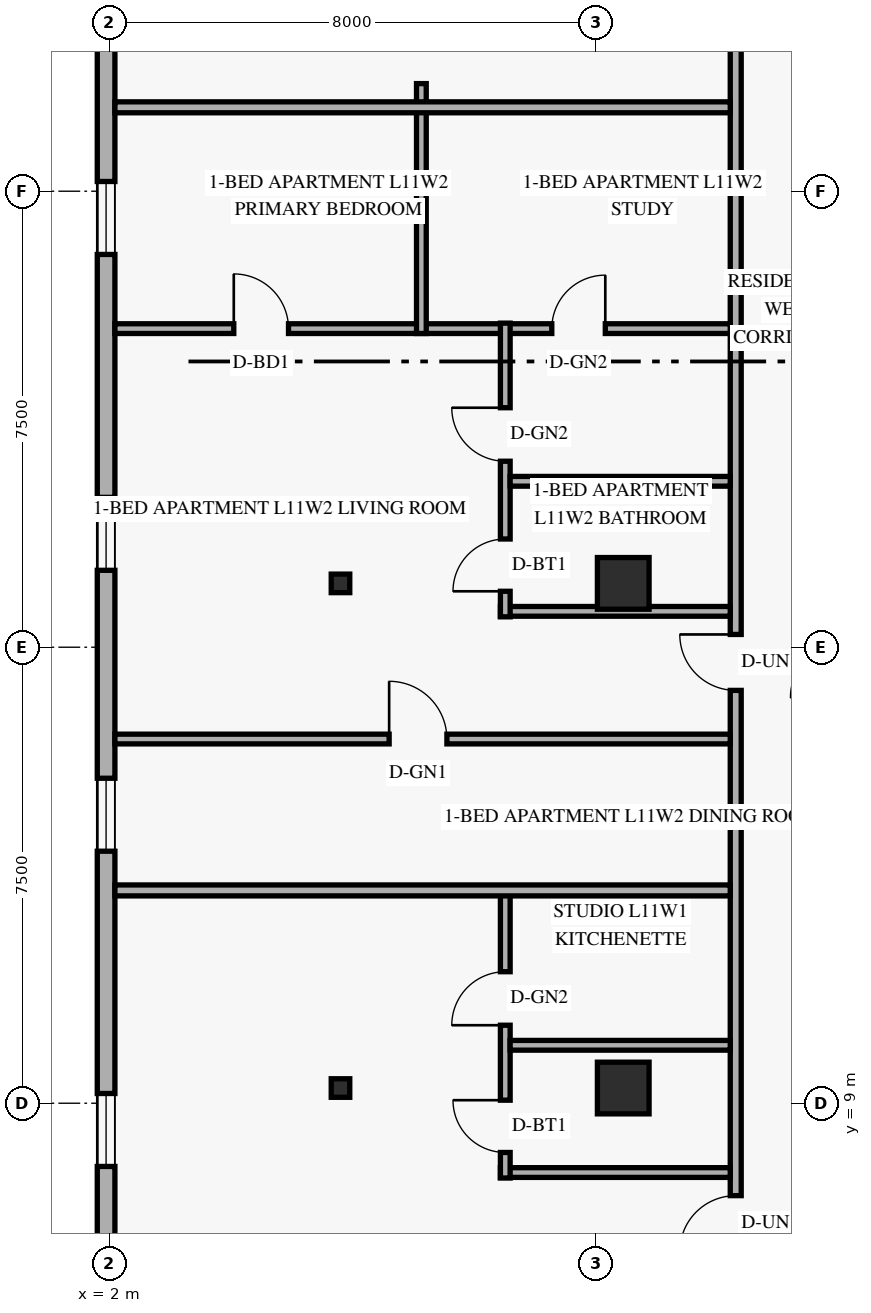
"""IFC4 building model, lengths in metres.
Left out: names, types, materials, properties, quantities, classifications, styles, units other than length and angle.
Written with IfcOpenShell. Run it as: python <this file> out.ifc"""

import sys

from ifc_helpers import new_model, si_unit, direction, frame, frame_2d, origin, origin_2d, place, context, subcontext, project, spatial, rectangle, hollow_rectangle, extrude, element, fill, save


model = new_model("IFC4")
c1 = context("Model", 3, precision=1e-05, world=origin(), true_north=direction((0.0, 1.0)))
c2 = subcontext(c1, "Body", "Model", "MODEL_VIEW")
j1 = project(units=[si_unit("LENGTHUNIT", "METRE"), si_unit("PLANEANGLEUNIT", "RADIAN")], contexts=[c1])
p1 = place(None, origin())
s1 = spatial("IfcSite", under=j1, at=p1, CompositionType="ELEMENT")
p2 = place(p1, origin())
s2 = spatial("IfcBuilding", under=s1, at=p2, CompositionType="ELEMENT")
p3 = place(p2, frame((0.0, 0.0, 45.6)))
s3 = spatial("IfcBuildingStorey", under=s2, at=p3, CompositionType="ELEMENT", Elevation=45.6)
for number, where, z_axis, x_axis in (
    (1, (5.8, 9.25, 0.0), (0.0, 0.0, 1.0), (1.0, 0.0, 0.0)),
    (2, (5.8, 17.55, 0.0), (0.0, 0.0, 1.0), (1.0, 0.0, 0.0)),
):
    element("IfcColumn", number, at=place(p3, frame(where, z_axis=z_axis, x_axis=x_axis)), inside=s3, PredefinedType="COLUMN", context=c2, shape_type="SweptSolid", body=[
        extrude(hollow_rectangle(XDim=0.305, YDim=0.305, WallThickness=0.013, at=origin_2d()), origin(), (0.0, 0.0, 1.0), 3.6),
    ])
for number, where, z_axis, x_axis in (
    (3, (10.45, 9.25, 0.0), (0.0, 0.0, 1.0), (1.0, 0.0, 0.0)),
    (4, (10.45, 17.55, 0.0), (0.0, 0.0, 1.0), (1.0, 0.0, 0.0)),
):
    element("IfcColumn", number, at=place(p3, frame(where, z_axis=z_axis, x_axis=x_axis)), inside=s3, PredefinedType="COLUMN", context=c2, shape_type="SweptSolid", body=[
        extrude(rectangle(XDim=0.85, YDim=0.85, at=origin_2d()), origin(), (0.0, 0.0, 1.0), 3.6),
    ])
p4 = place(p3, frame((1.945, 43.38, 0.0), z_axis=(0.0, 0.0, 1.0), x_axis=(0.0, -1.0, 0.0)))
e5 = element("IfcWall", 5, at=p4, inside=s3, PredefinedType="SOLIDWALL", context=c2, shape_type="SweptSolid", body=[
    extrude(rectangle(XDim=38.76, YDim=0.29, at=frame_2d((19.38, 0.0))), origin(), (0.0, 0.0, 1.0), 3.36),
])
p5 = place(p4, frame((34.22, 0.0, 0.85)))
e6 = element("IfcOpeningElement", 6, at=p5, cuts=e5, PredefinedType="OPENING", context=c2, shape_type="SweptSolid", body=[
    extrude(rectangle(XDim=1.2, YDim=1.5, at=frame_2d((0.6, 0.75))), frame((0.0, 0.155, 0.0), z_axis=(0.0, -1.0, 0.0), x_axis=(1.0, 0.0, 0.0)), (0.0, 0.0, 1.0), 0.31),
])
p6 = place(p4, frame((29.035, 0.0, 0.85)))
e7 = element("IfcOpeningElement", 7, at=p6, cuts=e5, PredefinedType="OPENING", context=c2, shape_type="SweptSolid", body=[
    extrude(rectangle(XDim=1.2, YDim=1.5, at=frame_2d((0.6, 0.75))), frame((0.0, 0.155, 0.0), z_axis=(0.0, -1.0, 0.0), x_axis=(1.0, 0.0, 0.0)), (0.0, 0.0, 1.0), 0.31),
])
p7 = place(p4, frame((24.415, 0.0, 0.85)))
e8 = element("IfcOpeningElement", 8, at=p7, cuts=e5, PredefinedType="OPENING", context=c2, shape_type="SweptSolid", body=[
    extrude(rectangle(XDim=1.2, YDim=1.5, at=frame_2d((0.6, 0.75))), frame((0.0, 0.155, 0.0), z_axis=(0.0, -1.0, 0.0), x_axis=(1.0, 0.0, 0.0)), (0.0, 0.0, 1.0), 0.31),
])
p8 = place(p4, frame((19.22, 0.0, 0.85)))
e9 = element("IfcOpeningElement", 9, at=p8, cuts=e5, PredefinedType="OPENING", context=c2, shape_type="SweptSolid", body=[
    extrude(rectangle(XDim=1.2, YDim=1.5, at=frame_2d((0.6, 0.75))), frame((0.0, 0.155, 0.0), z_axis=(0.0, -1.0, 0.0), x_axis=(1.0, 0.0, 0.0)), (0.0, 0.0, 1.0), 0.31),
])
p9 = place(p4, frame((13.415, 0.0, 0.85)))
e10 = element("IfcOpeningElement", 10, at=p9, cuts=e5, PredefinedType="OPENING", context=c2, shape_type="SweptSolid", body=[
    extrude(rectangle(XDim=1.2, YDim=1.5, at=frame_2d((0.6, 0.75))), frame((0.0, 0.155, 0.0), z_axis=(0.0, -1.0, 0.0), x_axis=(1.0, 0.0, 0.0)), (0.0, 0.0, 1.0), 0.31),
])
p10 = place(p4, frame((7.435, 0.0, 0.85)))
e11 = element("IfcOpeningElement", 11, at=p10, cuts=e5, PredefinedType="OPENING", context=c2, shape_type="SweptSolid", body=[
    extrude(rectangle(XDim=1.2, YDim=1.5, at=frame_2d((0.6, 0.75))), frame((0.0, 0.155, 0.0), z_axis=(0.0, -1.0, 0.0), x_axis=(1.0, 0.0, 0.0)), (0.0, 0.0, 1.0), 0.31),
])
p11 = place(p4, frame((2.42, 0.0, 0.85)))
e12 = element("IfcOpeningElement", 12, at=p11, cuts=e5, PredefinedType="OPENING", context=c2, shape_type="SweptSolid", body=[
    extrude(rectangle(XDim=1.2, YDim=1.5, at=frame_2d((0.6, 0.75))), frame((0.0, 0.155, 0.0), z_axis=(0.0, -1.0, 0.0), x_axis=(1.0, 0.0, 0.0)), (0.0, 0.0, 1.0), 0.31),
])
p12 = place(p3, frame((12.3, 1.29, 0.0), z_axis=(0.0, 0.0, 1.0), x_axis=(0.0, 1.0, 0.0)))
e13 = element("IfcWall", 13, at=p12, inside=s3, PredefinedType="STANDARD", context=c2, shape_type="SweptSolid", body=[
    extrude(rectangle(XDim=45.42, YDim=0.18, at=frame_2d((22.71, 0.0))), origin(), (0.0, 0.0, 1.0), 2.649),
])
p13 = place(p12, frame((5.27, 0.0, 0.0)))
e14 = element("IfcOpeningElement", 14, at=p13, cuts=e13, PredefinedType="OPENING", context=c2, shape_type="SweptSolid", body=[
    extrude(rectangle(XDim=0.92, YDim=2.15, at=frame_2d((0.46, 1.075))), frame((0.0, 0.1, 0.0), z_axis=(0.0, -1.0, 0.0), x_axis=(1.0, 0.0, 0.0)), (0.0, 0.0, 1.0), 0.2),
])
p14 = place(p12, frame((14.5, 0.0, 0.0)))
e15 = element("IfcOpeningElement", 15, at=p14, cuts=e13, PredefinedType="OPENING", context=c2, shape_type="SweptSolid", body=[
    extrude(rectangle(XDim=0.92, YDim=2.15, at=frame_2d((0.46, 1.075))), frame((0.0, 0.1, 0.0), z_axis=(0.0, -1.0, 0.0), x_axis=(1.0, 0.0, 0.0)), (0.0, 0.0, 1.0), 0.2),
])
p15 = place(p12, frame((26.082, 0.0, 0.0)))
e16 = element("IfcOpeningElement", 16, at=p15, cuts=e13, PredefinedType="OPENING", context=c2, shape_type="SweptSolid", body=[
    extrude(rectangle(XDim=0.92, YDim=2.15, at=frame_2d((0.46, 1.075))), frame((0.0, 0.1, 0.0), z_axis=(0.0, -1.0, 0.0), x_axis=(1.0, 0.0, 0.0)), (0.0, 0.0, 1.0), 0.2),
])
p16 = place(p12, frame((41.05, 0.0, 0.0)))
e17 = element("IfcOpeningElement", 17, at=p16, cuts=e13, PredefinedType="OPENING", context=c2, shape_type="SweptSolid", body=[
    extrude(rectangle(XDim=0.92, YDim=2.15, at=frame_2d((0.46, 1.075))), frame((0.0, 0.1, 0.0), z_axis=(0.0, -1.0, 0.0), x_axis=(1.0, 0.0, 0.0)), (0.0, 0.0, 1.0), 0.2),
])
p17 = place(p3, frame((8.43, 7.86, 0.0), z_axis=(0.0, 0.0, 1.0), x_axis=(1.0, 0.0, 0.0)))
e18 = element("IfcWall", 18, at=p17, inside=s3, PredefinedType="PLUMBINGWALL", context=c2, shape_type="SweptSolid", body=[
    extrude(rectangle(XDim=3.78, YDim=0.16, at=frame_2d((1.89, 0.0))), origin(), (0.0, 0.0, 1.0), 2.649),
])
p18 = place(p3, frame((8.51, 7.77, 0.0), z_axis=(0.0, 0.0, 1.0), x_axis=(0.0, 1.0, 0.0)))
e19 = element("IfcWall", 19, at=p18, inside=s3, PredefinedType="PLUMBINGWALL", context=c2, shape_type="SweptSolid", body=[
    extrude(rectangle(XDim=4.73, YDim=0.16, at=frame_2d((2.365, 0.0))), origin(), (0.0, 0.0, 1.0), 2.649),
])
p19 = place(p18, frame((0.42, 0.0, 0.0)))
e20 = element("IfcOpeningElement", 20, at=p19, cuts=e19, PredefinedType="OPENING", context=c2, shape_type="SweptSolid", body=[
    extrude(rectangle(XDim=0.86, YDim=2.12, at=frame_2d((0.43, 1.06))), frame((0.0, 0.09, 0.0), z_axis=(0.0, -1.0, 0.0), x_axis=(1.0, 0.0, 0.0)), (0.0, 0.0, 1.0), 0.18),
])
p20 = place(p18, frame((2.513, 0.0, 0.0)))
e21 = element("IfcOpeningElement", 21, at=p20, cuts=e19, PredefinedType="OPENING", context=c2, shape_type="SweptSolid", body=[
    extrude(rectangle(XDim=0.88, YDim=2.12, at=frame_2d((0.44, 1.06))), frame((0.0, 0.09, 0.0), z_axis=(0.0, -1.0, 0.0), x_axis=(1.0, 0.0, 0.0)), (0.0, 0.0, 1.0), 0.18),
])
p21 = place(p3, frame((8.59, 9.953, 0.0), z_axis=(0.0, 0.0, 1.0), x_axis=(1.0, 0.0, 0.0)))
e22 = element("IfcWall", 22, at=p21, inside=s3, PredefinedType="PLUMBINGWALL", context=c2, shape_type="SweptSolid", body=[
    extrude(rectangle(XDim=3.62, YDim=0.16, at=frame_2d((1.81, 0.0))), origin(), (0.0, 0.0, 1.0), 2.649),
])
p22 = place(p3, frame((2.09, 12.5, 0.0), z_axis=(0.0, 0.0, 1.0), x_axis=(1.0, 0.0, 0.0)))
e23 = element("IfcWall", 23, at=p22, inside=s3, PredefinedType="PARTITIONING", context=c2, shape_type="SweptSolid", body=[
    extrude(rectangle(XDim=10.12, YDim=0.18, at=frame_2d((5.06, 0.0))), origin(), (0.0, 0.0, 1.0), 2.649),
])
p23 = place(p3, frame((2.09, 21.74, 0.0), z_axis=(0.0, 0.0, 1.0), x_axis=(1.0, 0.0, 0.0)))
e24 = element("IfcWall", 24, at=p23, inside=s3, PredefinedType="PARTITIONING", context=c2, shape_type="SweptSolid", body=[
    extrude(rectangle(XDim=10.12, YDim=0.16, at=frame_2d((5.06, 0.0))), origin(), (0.0, 0.0, 1.0), 2.649),
])
p24 = place(p23, frame((7.185, 0.0, 0.0)))
e25 = element("IfcOpeningElement", 25, at=p24, cuts=e24, PredefinedType="OPENING", context=c2, shape_type="SweptSolid", body=[
    extrude(rectangle(XDim=0.88, YDim=2.12, at=frame_2d((0.44, 1.06))), frame((0.0, 0.09, 0.0), z_axis=(0.0, -1.0, 0.0), x_axis=(1.0, 0.0, 0.0)), (0.0, 0.0, 1.0), 0.18),
])
p25 = place(p23, frame((1.955, 0.0, 0.0)))
e26 = element("IfcOpeningElement", 26, at=p25, cuts=e24, PredefinedType="OPENING", context=c2, shape_type="SweptSolid", body=[
    extrude(rectangle(XDim=0.9, YDim=2.14, at=frame_2d((0.45, 1.07))), frame((0.0, 0.09, 0.0), z_axis=(0.0, -1.0, 0.0), x_axis=(1.0, 0.0, 0.0)), (0.0, 0.0, 1.0), 0.18),
])
p26 = place(p3, frame((8.43, 17.09, 0.0), z_axis=(0.0, 0.0, 1.0), x_axis=(1.0, 0.0, 0.0)))
e27 = element("IfcWall", 27, at=p26, inside=s3, PredefinedType="PLUMBINGWALL", context=c2, shape_type="SweptSolid", body=[
    extrude(rectangle(XDim=3.78, YDim=0.16, at=frame_2d((1.89, 0.0))), origin(), (0.0, 0.0, 1.0), 2.649),
])
p27 = place(p3, frame((8.51, 17.0, 0.0), z_axis=(0.0, 0.0, 1.0), x_axis=(0.0, 1.0, 0.0)))
e28 = element("IfcWall", 28, at=p27, inside=s3, PredefinedType="PLUMBINGWALL", context=c2, shape_type="SweptSolid", body=[
    extrude(rectangle(XDim=4.83, YDim=0.16, at=frame_2d((2.415, 0.0))), origin(), (0.0, 0.0, 1.0), 2.649),
])
p28 = place(p27, frame((0.42, 0.0, 0.0)))
e29 = element("IfcOpeningElement", 29, at=p28, cuts=e28, PredefinedType="OPENING", context=c2, shape_type="SweptSolid", body=[
    extrude(rectangle(XDim=0.86, YDim=2.12, at=frame_2d((0.43, 1.06))), frame((0.0, 0.09, 0.0), z_axis=(0.0, -1.0, 0.0), x_axis=(1.0, 0.0, 0.0)), (0.0, 0.0, 1.0), 0.18),
])
p29 = place(p27, frame((2.559, 0.0, 0.0)))
e30 = element("IfcOpeningElement", 30, at=p29, cuts=e28, PredefinedType="OPENING", context=c2, shape_type="SweptSolid", body=[
    extrude(rectangle(XDim=0.88, YDim=2.12, at=frame_2d((0.44, 1.06))), frame((0.0, 0.09, 0.0), z_axis=(0.0, -1.0, 0.0), x_axis=(1.0, 0.0, 0.0)), (0.0, 0.0, 1.0), 0.18),
])
p30 = place(p3, frame((8.59, 19.229, 0.0), z_axis=(0.0, 0.0, 1.0), x_axis=(1.0, 0.0, 0.0)))
e31 = element("IfcWall", 31, at=p30, inside=s3, PredefinedType="PLUMBINGWALL", context=c2, shape_type="SweptSolid", body=[
    extrude(rectangle(XDim=3.62, YDim=0.16, at=frame_2d((1.81, 0.0))), origin(), (0.0, 0.0, 1.0), 2.649),
])
p31 = place(p3, frame((2.09, 14.99, 0.0), z_axis=(0.0, 0.0, 1.0), x_axis=(1.0, 0.0, 0.0)))
e32 = element("IfcWall", 32, at=p31, inside=s3, PredefinedType="PARTITIONING", context=c2, shape_type="SweptSolid", body=[
    extrude(rectangle(XDim=10.12, YDim=0.16, at=frame_2d((5.06, 0.0))), origin(), (0.0, 0.0, 1.0), 2.649),
])
p32 = place(p31, frame((4.51, 0.0, 0.0)))
e33 = element("IfcOpeningElement", 33, at=p32, cuts=e32, PredefinedType="OPENING", context=c2, shape_type="SweptSolid", body=[
    extrude(rectangle(XDim=0.95, YDim=2.15, at=frame_2d((0.475, 1.075))), frame((0.0, 0.09, 0.0), z_axis=(0.0, -1.0, 0.0), x_axis=(1.0, 0.0, 0.0)), (0.0, 0.0, 1.0), 0.18),
])
p33 = place(p3, frame((7.13, 21.66, 0.0), z_axis=(0.0, 0.0, 1.0), x_axis=(0.0, 1.0, 0.0)))
e34 = element("IfcWall", 34, at=p33, inside=s3, PredefinedType="PARTITIONING", context=c2, shape_type="SweptSolid", body=[
    extrude(rectangle(XDim=4.11, YDim=0.16, at=frame_2d((2.055, 0.0))), origin(), (0.0, 0.0, 1.0), 3.36),
])
p34 = place(p3, frame((2.09, 25.38, 0.0), z_axis=(0.0, 0.0, 1.0), x_axis=(1.0, 0.0, 0.0)))
e35 = element("IfcWall", 35, at=p34, inside=s3, PredefinedType="PARTITIONING", context=c2, shape_type="SweptSolid", body=[
    extrude(rectangle(XDim=10.12, YDim=0.18, at=frame_2d((5.06, 0.0))), origin(), (0.0, 0.0, 1.0), 2.649),
])
p35 = place(p5, origin())
e36 = element("IfcWindow", 36, at=p35, inside=s3, PartitioningType="SINGLE_PANEL", PredefinedType="WINDOW", context=c2, shape_type="SweptSolid", body=[
    extrude(rectangle(XDim=1.2, YDim=1.5, at=frame_2d((0.6, 0.75))), frame((0.0, 0.03, 0.0), z_axis=(0.0, -1.0, 0.0), x_axis=(1.0, 0.0, 0.0)), (0.0, 0.0, 1.0), 0.06),
])
fill(e6, e36)
p36 = place(p6, origin())
e37 = element("IfcWindow", 37, at=p36, inside=s3, PartitioningType="SINGLE_PANEL", PredefinedType="WINDOW", context=c2, shape_type="SweptSolid", body=[
    extrude(rectangle(XDim=1.2, YDim=1.5, at=frame_2d((0.6, 0.75))), frame((0.0, 0.03, 0.0), z_axis=(0.0, -1.0, 0.0), x_axis=(1.0, 0.0, 0.0)), (0.0, 0.0, 1.0), 0.06),
])
fill(e7, e37)
p37 = place(p7, origin())
e38 = element("IfcWindow", 38, at=p37, inside=s3, PartitioningType="SINGLE_PANEL", PredefinedType="WINDOW", context=c2, shape_type="SweptSolid", body=[
    extrude(rectangle(XDim=1.2, YDim=1.5, at=frame_2d((0.6, 0.75))), frame((0.0, 0.03, 0.0), z_axis=(0.0, -1.0, 0.0), x_axis=(1.0, 0.0, 0.0)), (0.0, 0.0, 1.0), 0.06),
])
fill(e8, e38)
p38 = place(p8, origin())
e39 = element("IfcWindow", 39, at=p38, inside=s3, PartitioningType="SINGLE_PANEL", PredefinedType="WINDOW", context=c2, shape_type="SweptSolid", body=[
    extrude(rectangle(XDim=1.2, YDim=1.5, at=frame_2d((0.6, 0.75))), frame((0.0, 0.03, 0.0), z_axis=(0.0, -1.0, 0.0), x_axis=(1.0, 0.0, 0.0)), (0.0, 0.0, 1.0), 0.06),
])
fill(e9, e39)
p39 = place(p13, origin())
e40 = element("IfcDoor", 40, at=p39, inside=s3, OperationType="SINGLE_SWING_LEFT", PredefinedType="DOOR", context=c2, shape_type="SweptSolid", body=[
    extrude(rectangle(XDim=0.92, YDim=2.15, at=frame_2d((0.46, 1.075))), frame((0.0, 0.025, 0.0), z_axis=(0.0, -1.0, 0.0), x_axis=(1.0, 0.0, 0.0)), (0.0, 0.0, 1.0), 0.05),
])
fill(e14, e40)
p40 = place(p19, origin())
e41 = element("IfcDoor", 41, at=p40, inside=s3, OperationType="SINGLE_SWING_RIGHT", PredefinedType="DOOR", context=c2, shape_type="SweptSolid", body=[
    extrude(rectangle(XDim=0.86, YDim=2.12, at=frame_2d((0.43, 1.06))), frame((0.0, 0.025, 0.0), z_axis=(0.0, -1.0, 0.0), x_axis=(1.0, 0.0, 0.0)), (0.0, 0.0, 1.0), 0.05),
])
fill(e20, e41)
p41 = place(p20, origin())
e42 = element("IfcDoor", 42, at=p41, inside=s3, OperationType="SINGLE_SWING_LEFT", PredefinedType="DOOR", context=c2, shape_type="SweptSolid", body=[
    extrude(rectangle(XDim=0.88, YDim=2.12, at=frame_2d((0.44, 1.06))), frame((0.0, 0.025, 0.0), z_axis=(0.0, -1.0, 0.0), x_axis=(1.0, 0.0, 0.0)), (0.0, 0.0, 1.0), 0.05),
])
fill(e21, e42)
p42 = place(p32, origin())
e43 = element("IfcDoor", 43, at=p42, inside=s3, OperationType="SINGLE_SWING_LEFT", PredefinedType="DOOR", context=c2, shape_type="SweptSolid", body=[
    extrude(rectangle(XDim=0.95, YDim=2.15, at=frame_2d((0.475, 1.075))), frame((0.0, 0.025, 0.0), z_axis=(0.0, -1.0, 0.0), x_axis=(1.0, 0.0, 0.0)), (0.0, 0.0, 1.0), 0.05),
])
fill(e33, e43)
p43 = place(p14, origin())
e44 = element("IfcDoor", 44, at=p43, inside=s3, OperationType="SINGLE_SWING_RIGHT", PredefinedType="DOOR", context=c2, shape_type="SweptSolid", body=[
    extrude(rectangle(XDim=0.92, YDim=2.15, at=frame_2d((0.46, 1.075))), frame((0.0, 0.025, 0.0), z_axis=(0.0, -1.0, 0.0), x_axis=(1.0, 0.0, 0.0)), (0.0, 0.0, 1.0), 0.05),
])
fill(e15, e44)
p44 = place(p28, origin())
e45 = element("IfcDoor", 45, at=p44, inside=s3, OperationType="SINGLE_SWING_LEFT", PredefinedType="DOOR", context=c2, shape_type="SweptSolid", body=[
    extrude(rectangle(XDim=0.86, YDim=2.12, at=frame_2d((0.43, 1.06))), frame((0.0, 0.025, 0.0), z_axis=(0.0, -1.0, 0.0), x_axis=(1.0, 0.0, 0.0)), (0.0, 0.0, 1.0), 0.05),
])
fill(e29, e45)
p45 = place(p29, origin())
e46 = element("IfcDoor", 46, at=p45, inside=s3, OperationType="SINGLE_SWING_RIGHT", PredefinedType="DOOR", context=c2, shape_type="SweptSolid", body=[
    extrude(rectangle(XDim=0.88, YDim=2.12, at=frame_2d((0.44, 1.06))), frame((0.0, 0.025, 0.0), z_axis=(0.0, -1.0, 0.0), x_axis=(1.0, 0.0, 0.0)), (0.0, 0.0, 1.0), 0.05),
])
fill(e30, e46)
p46 = place(p24, origin())
e47 = element("IfcDoor", 47, at=p46, inside=s3, OperationType="SINGLE_SWING_RIGHT", PredefinedType="DOOR", context=c2, shape_type="SweptSolid", body=[
    extrude(rectangle(XDim=0.88, YDim=2.12, at=frame_2d((0.44, 1.06))), frame((0.0, 0.025, 0.0), z_axis=(0.0, -1.0, 0.0), x_axis=(1.0, 0.0, 0.0)), (0.0, 0.0, 1.0), 0.05),
])
fill(e25, e47)
p47 = place(p25, origin())
e48 = element("IfcDoor", 48, at=p47, inside=s3, OperationType="SINGLE_SWING_LEFT", PredefinedType="DOOR", context=c2, shape_type="SweptSolid", body=[
    extrude(rectangle(XDim=0.9, YDim=2.14, at=frame_2d((0.45, 1.07))), frame((0.0, 0.025, 0.0), z_axis=(0.0, -1.0, 0.0), x_axis=(1.0, 0.0, 0.0)), (0.0, 0.0, 1.0), 0.05),
])
fill(e26, e48)
save(model, sys.argv[1])
